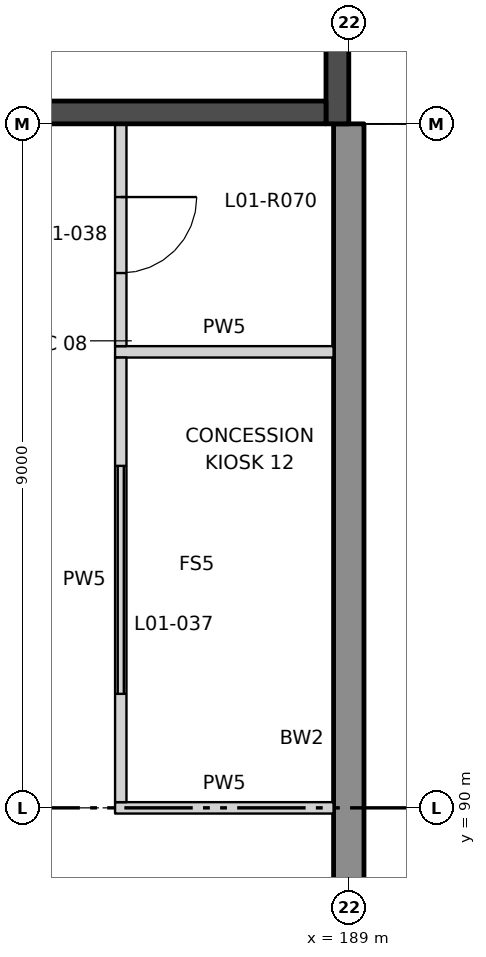
"""IFC4 building model, lengths in metres.
Left out: names, types, materials, properties, quantities, classifications, styles, units other than length and angle.
Written with IfcOpenShell. Run it as: python <this file> out.ifc"""

import sys

from ifc_helpers import new_model, si_unit, direction, frame, frame_2d, origin, place, context, subcontext, project, spatial, rectangle, extrude, element, fill, save


model = new_model("IFC4")
c1 = context("Model", 3, precision=1e-05, world=origin(), true_north=direction((0.0, 1.0)))
c2 = subcontext(c1, "Body", "Model", "MODEL_VIEW")
j1 = project(units=[si_unit("LENGTHUNIT", "METRE"), si_unit("PLANEANGLEUNIT", "RADIAN")], contexts=[c1])
p1 = place(None, origin())
s1 = spatial("IfcSite", under=j1, at=p1, CompositionType="ELEMENT")
p2 = place(p1, origin())
s2 = spatial("IfcBuilding", under=s1, at=p2, CompositionType="ELEMENT")
p3 = place(p2, frame((0.0, 0.0, 7.0)))
s3 = spatial("IfcBuildingStorey", under=s2, at=p3, CompositionType="ELEMENT", Elevation=7.0)
p4 = place(p3, frame((189.0, 82.8, 0.0), z_axis=(0.0, 0.0, 1.0), x_axis=(0.0, 1.0, 0.0)))
e1 = element("IfcWall", 1, at=p4, inside=s3, PredefinedType="SOLIDWALL", context=c2, shape_type="SweptSolid", body=[
    extrude(rectangle(XDim=16.2, YDim=0.4, at=frame_2d((8.1, 0.0))), origin(), (0.0, 0.0, 1.0), 4.5),
])
p5 = place(p3, frame((185.925, 90.0, 0.0), z_axis=(0.0, 0.0, 1.0), x_axis=(1.0, 0.0, 0.0)))
e2 = element("IfcWall", 2, at=p5, inside=s3, PredefinedType="PARTITIONING", context=c2, shape_type="SweptSolid", body=[
    extrude(rectangle(XDim=2.875, YDim=0.15, at=frame_2d((1.438, 0.0))), origin(), (0.0, 0.0, 1.0), 3.25),
])
p6 = place(p3, frame((185.925, 96.0, 0.0), z_axis=(0.0, 0.0, 1.0), x_axis=(1.0, 0.0, 0.0)))
e3 = element("IfcWall", 3, at=p6, inside=s3, PredefinedType="PARTITIONING", context=c2, shape_type="SweptSolid", body=[
    extrude(rectangle(XDim=2.875, YDim=0.15, at=frame_2d((1.438, 0.0))), origin(), (0.0, 0.0, 1.0), 4.5),
])
p7 = place(p3, frame((186.0, 90.075, 0.0), z_axis=(0.0, 0.0, 1.0), x_axis=(0.0, 1.0, 0.0)))
e4 = element("IfcWall", 4, at=p7, inside=s3, PredefinedType="PARTITIONING", context=c2, shape_type="SweptSolid", body=[
    extrude(rectangle(XDim=5.85, YDim=0.15, at=frame_2d((2.925, 0.0))), origin(), (0.0, 0.0, 1.0), 4.5),
])
p8 = place(p7, frame((1.425, 0.0, 0.0)))
e5 = element("IfcOpeningElement", 5, at=p8, cuts=e4, PredefinedType="OPENING", context=c2, shape_type="SweptSolid", body=[
    extrude(rectangle(XDim=3.0, YDim=2.4, at=frame_2d((1.5, 1.2))), frame((0.0, 0.085, 0.0), z_axis=(0.0, -1.0, 0.0), x_axis=(1.0, 0.0, 0.0)), (0.0, 0.0, 1.0), 0.17),
])
p9 = place(p3, frame((186.0, 96.075, 0.0), z_axis=(0.0, 0.0, 1.0), x_axis=(0.0, 1.0, 0.0)))
e6 = element("IfcWall", 6, at=p9, inside=s3, PredefinedType="PARTITIONING", context=c2, shape_type="SweptSolid", body=[
    extrude(rectangle(XDim=2.925, YDim=0.15, at=frame_2d((1.462, 0.0))), origin(), (0.0, 0.0, 1.0), 4.5),
])
p10 = place(p9, frame((0.962, 0.0, 0.0)))
e7 = element("IfcOpeningElement", 7, at=p10, cuts=e6, PredefinedType="OPENING", context=c2, shape_type="SweptSolid", body=[
    extrude(rectangle(XDim=1.0, YDim=2.1, at=frame_2d((0.5, 1.05))), frame((0.0, 0.085, 0.0), z_axis=(0.0, -1.0, 0.0), x_axis=(1.0, 0.0, 0.0)), (0.0, 0.0, 1.0), 0.17),
])
p11 = place(p3, frame((188.85, 99.0, 0.0), z_axis=(0.0, 0.0, 1.0), x_axis=(0.0, 1.0, 0.0)))
e8 = element("IfcWall", 8, at=p11, inside=s3, PredefinedType="SHEAR", context=c2, shape_type="SweptSolid", body=[
    extrude(rectangle(XDim=18.0, YDim=0.3, at=frame_2d((9.0, 0.0))), origin(), (0.0, 0.0, 1.0), 4.5),
])
p12 = place(p3, frame((180.3, 99.15, 0.0), z_axis=(0.0, 0.0, 1.0), x_axis=(1.0, 0.0, 0.0)))
e9 = element("IfcWall", 9, at=p12, inside=s3, PredefinedType="SHEAR", context=c2, shape_type="SweptSolid", body=[
    extrude(rectangle(XDim=8.4, YDim=0.3, at=frame_2d((4.2, 0.0))), origin(), (0.0, 0.0, 1.0), 4.5),
])
p13 = place(p8, origin())
e10 = element("IfcDoor", 10, at=p13, inside=s3, OperationType="ROLLINGUP", PredefinedType="DOOR", context=c2, shape_type="SweptSolid", body=[
    extrude(rectangle(XDim=3.0, YDim=2.4, at=frame_2d((1.5, 1.2))), frame((0.0, 0.025, 0.0), z_axis=(0.0, -1.0, 0.0), x_axis=(1.0, 0.0, 0.0)), (0.0, 0.0, 1.0), 0.05),
])
fill(e5, e10)
p14 = place(p10, frame((1.0, 0.0, 0.0), z_axis=(0.0, 0.0, 1.0), x_axis=(-1.0, 0.0, 0.0)))
e11 = element("IfcDoor", 11, at=p14, inside=s3, OperationType="SINGLE_SWING_LEFT", PredefinedType="DOOR", context=c2, shape_type="SweptSolid", body=[
    extrude(rectangle(XDim=1.0, YDim=2.1, at=frame_2d((0.5, 1.05))), frame((0.0, 0.025, 0.0), z_axis=(0.0, -1.0, 0.0), x_axis=(1.0, 0.0, 0.0)), (0.0, 0.0, 1.0), 0.05),
])
fill(e7, e11)
save(model, sys.argv[1])
